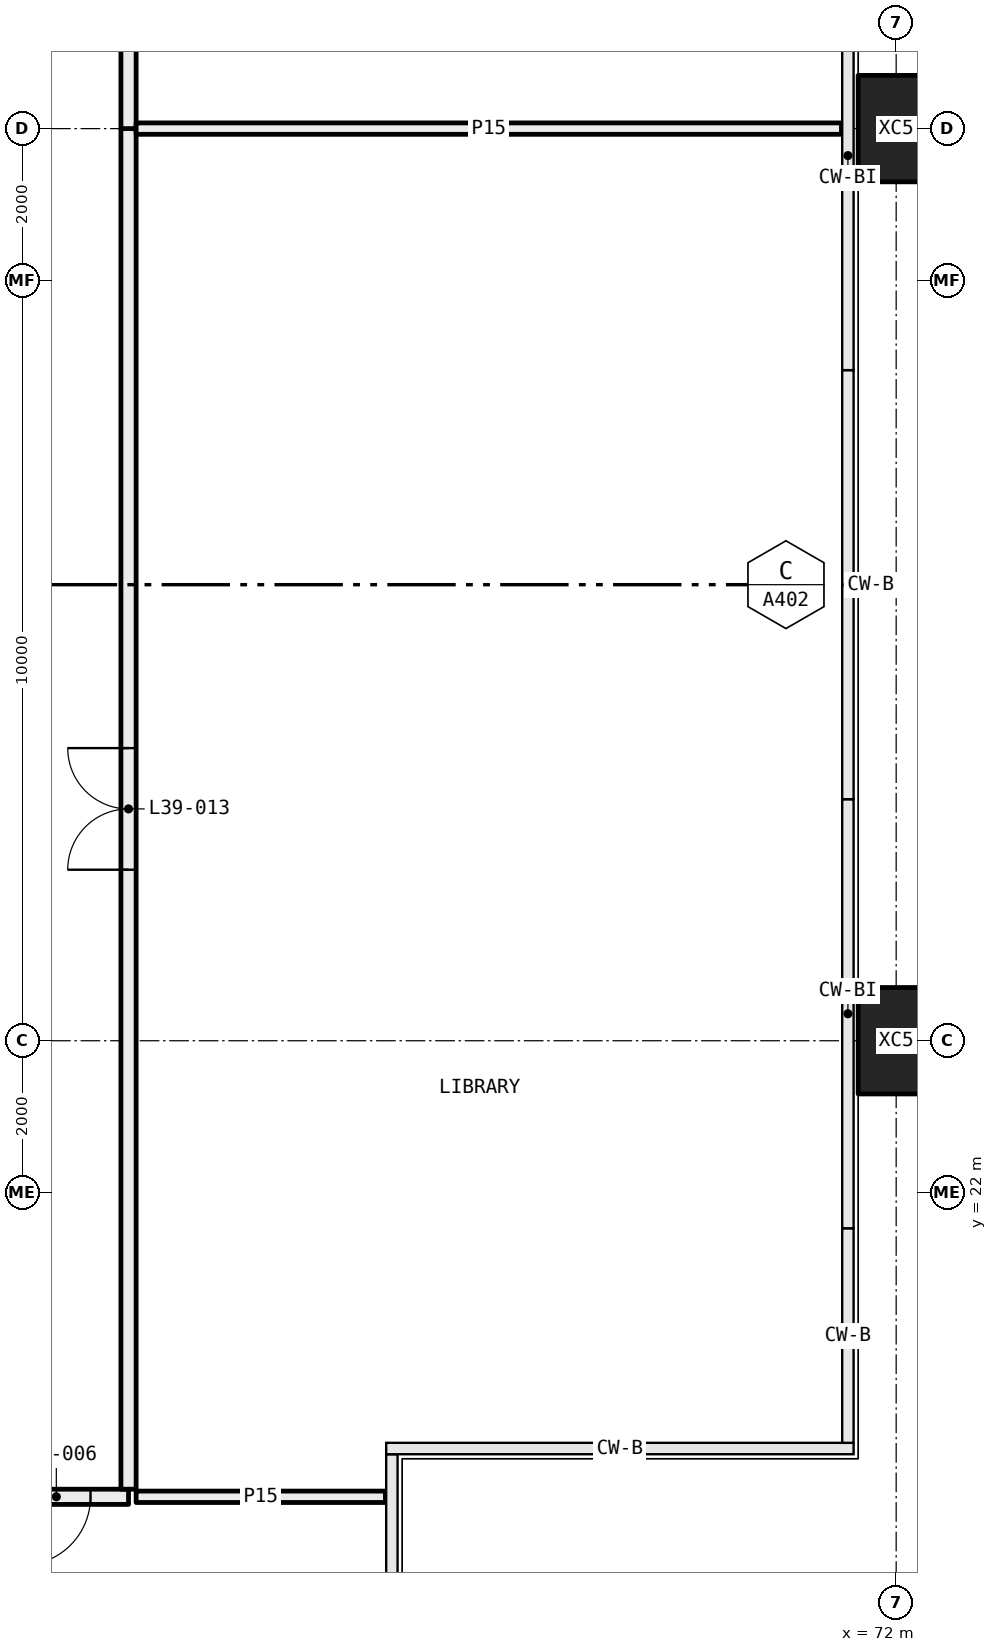
"""IFC4 building model, lengths in metres.
Left out: names, types, materials, properties, quantities, classifications, styles, units other than length and angle.
Written with IfcOpenShell. Run it as: python <this file> out.ifc"""

import sys

from ifc_helpers import new_model, si_unit, direction, frame, frame_2d, origin, origin_2d, place, context, subcontext, project, spatial, rectangle, hollow_rectangle, extrude, element, fill, save


model = new_model("IFC4")
c1 = context("Model", 3, precision=1e-05, world=origin(), true_north=direction((0.0, 1.0)))
c2 = subcontext(c1, "Body", "Model", "MODEL_VIEW")
j1 = project(units=[si_unit("LENGTHUNIT", "METRE"), si_unit("PLANEANGLEUNIT", "RADIAN")], contexts=[c1])
p1 = place(None, origin())
s1 = spatial("IfcSite", under=j1, at=p1, CompositionType="ELEMENT")
p2 = place(p1, origin())
s2 = spatial("IfcBuilding", under=s1, at=p2, CompositionType="ELEMENT")
p3 = place(p2, frame((0.0, 0.0, 148.35)))
s3 = spatial("IfcBuildingStorey", under=s2, at=p3, CompositionType="ELEMENT", Elevation=148.35)
for number, where, z_axis, x_axis in (
    (1, (72.0, 24.0, -0.4), (0.0, 0.0, 1.0), (0.0, 1.0, 0.0)),
    (2, (72.0, 36.0, -0.4), (0.0, 0.0, 1.0), (0.0, 1.0, 0.0)),
):
    element("IfcColumn", number, at=place(p3, frame(where, z_axis=z_axis, x_axis=x_axis)), inside=s3, PredefinedType="COLUMN", context=c2, shape_type="SweptSolid", body=[
        extrude(hollow_rectangle(XDim=1.4, YDim=1.0, WallThickness=0.055, at=origin_2d()), origin(), (0.0, 0.0, 1.0), 5.4),
    ])
p4 = place(p3, frame((60.0, 18.0, 0.0), z_axis=(0.0, 0.0, 1.0), x_axis=(1.0, 0.0, 0.0)))
e3 = element("IfcWall", 3, at=p4, inside=s3, PredefinedType="PARTITIONING", context=c2, shape_type="SweptSolid", body=[
    extrude(rectangle(XDim=1.9, YDim=0.2, at=frame_2d((0.95, 0.0))), origin(), (0.0, 0.0, 1.0), 5.0),
])
p5 = place(p4, frame((0.5, 0.0, 0.0)))
e4 = element("IfcOpeningElement", 4, at=p5, cuts=e3, PredefinedType="OPENING", context=c2, shape_type="SweptSolid", body=[
    extrude(rectangle(XDim=0.9, YDim=2.1, at=frame_2d((0.45, 1.05))), frame((0.0, 0.11, 0.0), z_axis=(0.0, -1.0, 0.0), x_axis=(1.0, 0.0, 0.0)), (0.0, 0.0, 1.0), 0.22),
])
p6 = place(p3, frame((61.9, 18.1, 0.0), z_axis=(0.0, 0.0, 1.0), x_axis=(0.0, 1.0, 0.0)))
e5 = element("IfcWall", 5, at=p6, inside=s3, PredefinedType="PARTITIONING", context=c2, shape_type="SweptSolid", body=[
    extrude(rectangle(XDim=17.9, YDim=0.2, at=frame_2d((8.95, 0.0))), origin(), (0.0, 0.0, 1.0), 4.4),
])
p7 = place(p6, frame((8.15, 0.0, 0.0)))
e6 = element("IfcOpeningElement", 6, at=p7, cuts=e5, PredefinedType="OPENING", context=c2, shape_type="SweptSolid", body=[
    extrude(rectangle(XDim=1.6, YDim=2.1, at=frame_2d((0.8, 1.05))), frame((0.0, 0.11, 0.0), z_axis=(0.0, -1.0, 0.0), x_axis=(1.0, 0.0, 0.0)), (0.0, 0.0, 1.0), 0.22),
])
p8 = place(p3, frame((61.9, 36.0, 0.0), z_axis=(0.0, 0.0, 1.0), x_axis=(0.0, 1.0, 0.0)))
e7 = element("IfcWall", 7, at=p8, inside=s3, PredefinedType="PARTITIONING", context=c2, shape_type="SweptSolid", body=[
    extrude(rectangle(XDim=6.4, YDim=0.2, at=frame_2d((3.2, 0.0))), origin(), (0.0, 0.0, 1.0), 4.4),
])
p9 = place(p8, frame((2.75, 0.0, 0.0)))
e8 = element("IfcOpeningElement", 8, at=p9, cuts=e7, PredefinedType="OPENING", context=c2, shape_type="SweptSolid", body=[
    extrude(rectangle(XDim=0.9, YDim=2.1, at=frame_2d((0.45, 1.05))), frame((0.0, 0.11, 0.0), z_axis=(0.0, -1.0, 0.0), x_axis=(1.0, 0.0, 0.0)), (0.0, 0.0, 1.0), 0.22),
])
p10 = place(p3, frame((65.28, 18.0, 0.0), z_axis=(0.0, 0.0, 1.0), x_axis=(-1.0, 0.0, 0.0)))
e9 = element("IfcWall", 9, at=p10, inside=s3, PredefinedType="PARTITIONING", context=c2, shape_type="SweptSolid", body=[
    extrude(rectangle(XDim=3.28, YDim=0.15, at=frame_2d((1.64, 0.0))), origin(), (0.0, 0.0, 1.0), 5.0),
])
p11 = place(p3, frame((71.28, 36.0, 0.0), z_axis=(0.0, 0.0, 1.0), x_axis=(-1.0, 0.0, 0.0)))
e10 = element("IfcWall", 10, at=p11, inside=s3, PredefinedType="PARTITIONING", context=c2, shape_type="SweptSolid", body=[
    extrude(rectangle(XDim=9.28, YDim=0.15, at=frame_2d((4.64, 0.0))), origin(), (0.0, 0.0, 1.0), 4.4),
])
p12 = place(p5, frame((0.9, 0.0, 0.0), x_axis=(-1.0, 0.0, 0.0)))
e11 = element("IfcDoor", 11, at=p12, inside=s3, OperationType="SINGLE_SWING_LEFT", PredefinedType="DOOR", context=c2, shape_type="SweptSolid", body=[
    extrude(rectangle(XDim=0.9, YDim=2.1, at=frame_2d((0.45, 1.05))), frame((0.0, 0.025, 0.0), z_axis=(0.0, -1.0, 0.0), x_axis=(1.0, 0.0, 0.0)), (0.0, 0.0, 1.0), 0.05),
])
fill(e4, e11)
p13 = place(p7, origin())
e12 = element("IfcDoor", 12, at=p13, inside=s3, OperationType="DOUBLE_DOOR_SINGLE_SWING", PredefinedType="DOOR", context=c2, shape_type="SweptSolid", body=[
    extrude(rectangle(XDim=1.6, YDim=2.1, at=frame_2d((0.8, 1.05))), frame((0.0, 0.025, 0.0), z_axis=(0.0, -1.0, 0.0), x_axis=(1.0, 0.0, 0.0)), (0.0, 0.0, 1.0), 0.05),
])
fill(e6, e12)
save(model, sys.argv[1])
